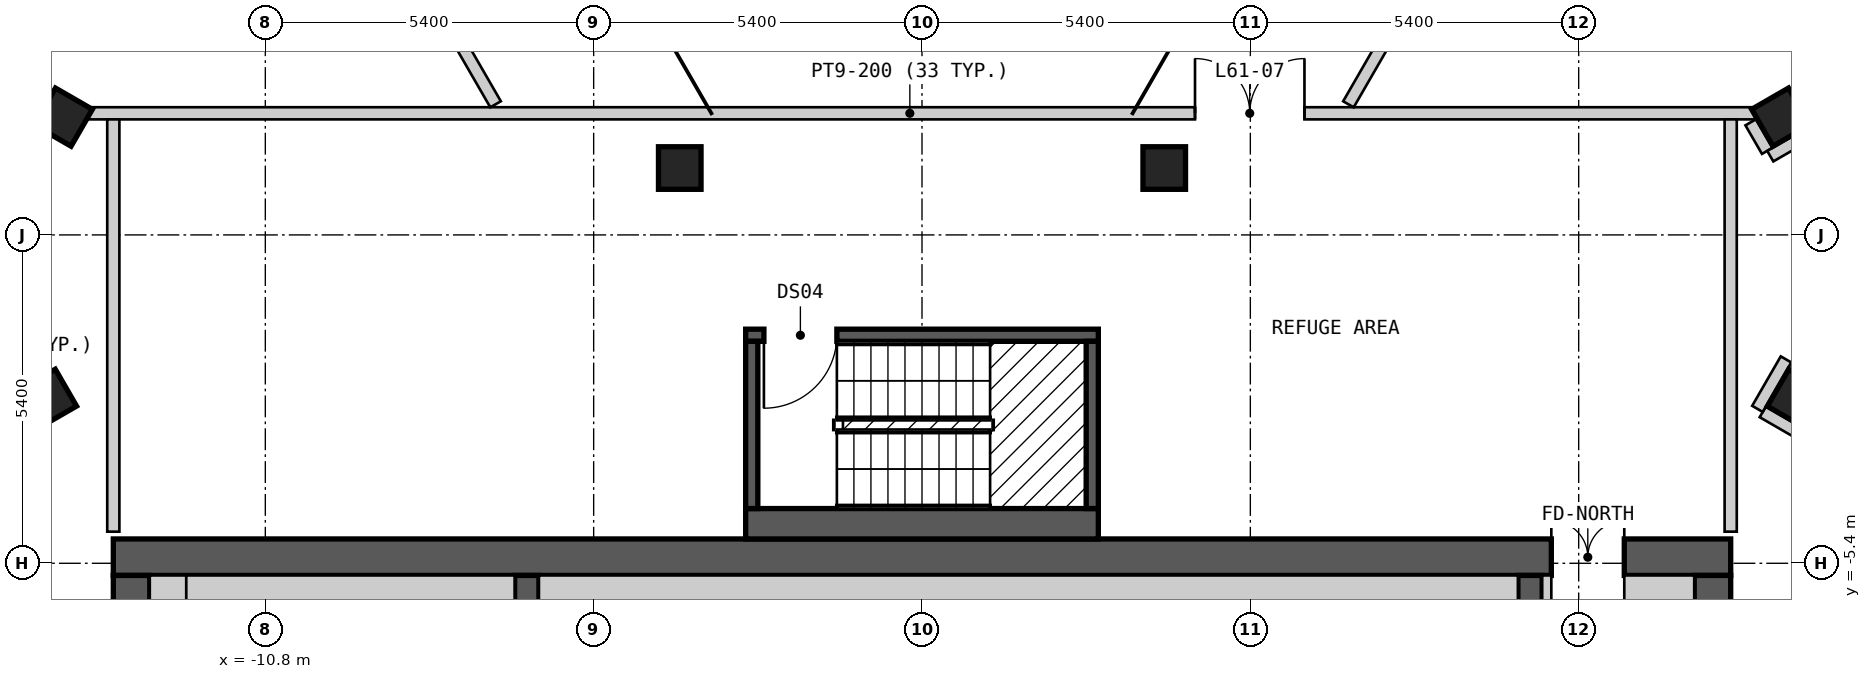
"""IFC4 building model, lengths in metres.
Left out: names, types, materials, properties, quantities, classifications, styles, units other than length and angle.
Written with IfcOpenShell. Run it as: python <this file> out.ifc"""

import sys

from ifc_helpers import new_model, si_unit, direction, frame, frame_2d, origin, origin_2d, place, context, subcontext, project, spatial, rectangle, extrude, element, fill, save


model = new_model("IFC4")
c1 = context("Model", 3, precision=1e-05, world=origin(), true_north=direction((0.0, 1.0)))
c2 = subcontext(c1, "Body", "Model", "MODEL_VIEW")
j1 = project(units=[si_unit("LENGTHUNIT", "METRE"), si_unit("PLANEANGLEUNIT", "RADIAN")], contexts=[c1])
p1 = place(None, origin())
s1 = spatial("IfcSite", under=j1, at=p1, CompositionType="ELEMENT")
p2 = place(p1, origin())
s2 = spatial("IfcBuilding", under=s1, at=p2, CompositionType="ELEMENT")
p3 = place(p2, frame((0.0, 0.0, 199.2)))
s3 = spatial("IfcBuildingStorey", under=s2, at=p3, CompositionType="ELEMENT", Elevation=199.2)
for number, where, z_axis, x_axis in (
    (1, (-14.383, -2.687, 0.0), (0.0, 0.0, 1.0), (0.5, -0.866, 0.0)),
    (2, (14.382, -2.689, 0.0), (0.0, 0.0, 1.0), (0.5, 0.866, 0.0)),
    (3, (14.123, 1.937, 0.0), (0.0, 0.0, 1.0), (-0.5, 0.866, 0.0)),
    (4, (3.984, 1.1, 0.0), (0.0, 0.0, 1.0), (1.0, 0.0, 0.0)),
    (5, (-3.984, 1.1, 0.0), (0.0, 0.0, 1.0), (1.0, 0.0, 0.0)),
    (6, (-14.123, 1.937, 0.0), (0.0, 0.0, 1.0), (-0.5, -0.866, 0.0)),
):
    element("IfcColumn", number, at=place(p3, frame(where, z_axis=z_axis, x_axis=x_axis)), inside=s3, PredefinedType="COLUMN", context=c2, shape_type="SweptSolid", body=[
        extrude(rectangle(XDim=0.7, YDim=0.7, at=origin_2d()), origin(), (0.0, 0.0, 1.0), 3.6),
    ])
p4 = place(p3, frame((-13.3, -5.3, 0.0), z_axis=(0.0, 0.0, 1.0), x_axis=(1.0, 0.0, 0.0)))
e7 = element("IfcWall", 7, at=p4, inside=s3, PredefinedType="SHEAR", context=c2, shape_type="SweptSolid", body=[
    extrude(rectangle(XDim=26.6, YDim=0.6, at=frame_2d((13.3, 0.0))), origin(), (0.0, 0.0, 1.0), 2.6),
])
p5 = place(p4, frame((23.65, 0.0, 0.0)))
e8 = element("IfcOpeningElement", 8, at=p5, cuts=e7, PredefinedType="OPENING", context=c2, shape_type="SweptSolid", body=[
    extrude(rectangle(XDim=1.2, YDim=2.1, at=frame_2d((0.6, 1.05))), frame((0.0, 0.31, 0.0), z_axis=(0.0, -1.0, 0.0), x_axis=(1.0, 0.0, 0.0)), (0.0, 0.0, 1.0), 0.62),
])
p6 = place(p3, frame((-13.0, -18.4, 0.0), z_axis=(0.0, 0.0, 1.0), x_axis=(0.0, 1.0, 0.0)))
e9 = element("IfcWall", 9, at=p6, inside=s3, PredefinedType="SHEAR", context=c2, shape_type="SweptSolid", body=[
    extrude(rectangle(XDim=12.8, YDim=0.6, at=frame_2d((6.4, 0.0))), origin(), (0.0, 0.0, 1.0), 2.6),
])
p7 = place(p6, frame((4.2, 0.0, 0.0)))
e10 = element("IfcOpeningElement", 10, at=p7, cuts=e9, PredefinedType="OPENING", context=c2, shape_type="SweptSolid", body=[
    extrude(rectangle(XDim=1.2, YDim=2.1, at=frame_2d((0.6, 1.05))), frame((0.0, 0.31, 0.0), z_axis=(0.0, -1.0, 0.0), x_axis=(1.0, 0.0, 0.0)), (0.0, 0.0, 1.0), 0.62),
])
p8 = place(p3, frame((13.0, -18.4, 0.0), z_axis=(0.0, 0.0, 1.0), x_axis=(0.0, 1.0, 0.0)))
e11 = element("IfcWall", 11, at=p8, inside=s3, PredefinedType="SHEAR", context=c2, shape_type="SweptSolid", body=[
    extrude(rectangle(XDim=12.8, YDim=0.6, at=frame_2d((6.4, 0.0))), origin(), (0.0, 0.0, 1.0), 2.6),
])
for number, where, z_axis, x_axis in (
    (12, (-6.5, -9.15, 0.0), (0.0, 0.0, 1.0), (0.0, 1.0, 0.0)),
    (13, (10.0, -9.15, 0.0), (0.0, 0.0, 1.0), (0.0, 1.0, 0.0)),
):
    element("IfcWall", number, at=place(p3, frame(where, z_axis=z_axis, x_axis=x_axis)), inside=s3, PredefinedType="SHEAR", context=c2, shape_type="SweptSolid", body=[
        extrude(rectangle(XDim=3.55, YDim=0.4, at=frame_2d((1.775, 0.0))), origin(), (0.0, 0.0, 1.0), 2.6),
    ])
p9 = place(p3, frame((-2.9, -4.75, 0.0), z_axis=(0.0, 0.0, 1.0), x_axis=(1.0, 0.0, 0.0)))
e14 = element("IfcWall", 14, at=p9, inside=s3, PredefinedType="SOLIDWALL", context=c2, shape_type="SweptSolid", body=[
    extrude(rectangle(XDim=5.8, YDim=0.5, at=frame_2d((2.9, 0.0))), origin(), (0.0, 0.0, 1.0), 2.6),
])
p10 = place(p3, frame((-2.9, -1.65, 0.0), z_axis=(0.0, 0.0, 1.0), x_axis=(1.0, 0.0, 0.0)))
e15 = element("IfcWall", 15, at=p10, inside=s3, PredefinedType="SOLIDWALL", context=c2, shape_type="SweptSolid", body=[
    extrude(rectangle(XDim=5.8, YDim=0.2, at=frame_2d((2.9, 0.0))), origin(), (0.0, 0.0, 1.0), 2.6),
])
p11 = place(p10, frame((0.3, 0.0, 0.0)))
e16 = element("IfcOpeningElement", 16, at=p11, cuts=e15, PredefinedType="OPENING", context=c2, shape_type="SweptSolid", body=[
    extrude(rectangle(XDim=1.2, YDim=2.1, at=frame_2d((0.6, 1.05))), frame((0.0, 0.11, 0.0), z_axis=(0.0, -1.0, 0.0), x_axis=(1.0, 0.0, 0.0)), (0.0, 0.0, 1.0), 0.22),
])
for number, where, z_axis, x_axis in (
    (17, (-2.8, -4.5, 0.0), (0.0, 0.0, 1.0), (0.0, 1.0, 0.0)),
    (18, (2.8, -4.5, 0.0), (0.0, 0.0, 1.0), (0.0, 1.0, 0.0)),
):
    element("IfcWall", number, at=place(p3, frame(where, z_axis=z_axis, x_axis=x_axis)), inside=s3, PredefinedType="SOLIDWALL", context=c2, shape_type="SweptSolid", body=[
        extrude(rectangle(XDim=2.75, YDim=0.2, at=frame_2d((1.375, 0.0))), origin(), (0.0, 0.0, 1.0), 2.6),
    ])
p12 = place(p3, frame((-21.482, 2.0, 0.0), z_axis=(0.0, 0.0, 1.0), x_axis=(1.0, 0.0, 0.0)))
e19 = element("IfcWall", 19, at=p12, inside=s3, PredefinedType="SOLIDWALL", context=c2, shape_type="SweptSolid", body=[
    extrude(rectangle(XDim=42.564, YDim=0.2, at=frame_2d((21.282, 0.0))), origin(), (0.0, 0.0, 1.0), 2.6),
])
p13 = place(p12, frame((4.432, 0.0, 0.0)))
e20 = element("IfcOpeningElement", 20, at=p13, cuts=e19, PredefinedType="OPENING", context=c2, shape_type="SweptSolid", body=[
    extrude(rectangle(XDim=1.0, YDim=2.1, at=frame_2d((0.5, 1.05))), frame((0.0, 0.11, 0.0), z_axis=(0.0, -1.0, 0.0), x_axis=(1.0, 0.0, 0.0)), (0.0, 0.0, 1.0), 0.22),
])
p14 = place(p12, frame((25.972, 0.0, 0.0)))
e21 = element("IfcOpeningElement", 21, at=p14, cuts=e19, PredefinedType="OPENING", context=c2, shape_type="SweptSolid", body=[
    extrude(rectangle(XDim=1.8, YDim=2.1, at=frame_2d((0.9, 1.05))), frame((0.0, 0.11, 0.0), z_axis=(0.0, -1.0, 0.0), x_axis=(1.0, 0.0, 0.0)), (0.0, 0.0, 1.0), 0.22),
])
for number, where, z_axis, x_axis in (
    (22, (-13.3, -4.88, 0.0), (0.0, 0.0, 1.0), (0.0, 1.0, 0.0)),
    (23, (13.3, -4.88, 0.0), (0.0, 0.0, 1.0), (0.0, 1.0, 0.0)),
):
    element("IfcWall", number, at=place(p3, frame(where, z_axis=z_axis, x_axis=x_axis)), inside=s3, PredefinedType="PARTITIONING", context=c2, shape_type="SweptSolid", body=[
        extrude(rectangle(XDim=6.78, YDim=0.2, at=frame_2d((3.39, 0.0))), origin(), (0.0, 0.0, 1.0), 2.6),
    ])
p15 = place(p3, frame((14.297, -2.097, 0.0), z_axis=(0.0, 0.0, 1.0), x_axis=(0.865922902183, -0.50017749597, 0.0)))
e24 = element("IfcWall", 24, at=p15, inside=s3, PredefinedType="SOLIDWALL", context=c2, shape_type="SweptSolid", body=[
    extrude(rectangle(XDim=0.65, YDim=0.2, at=frame_2d((0.325, 0.0))), origin(), (0.0, 0.0, 1.0), 2.6),
])
p16 = place(p3, frame((13.827, -2.911, 0.0), z_axis=(0.0, 0.0, 1.0), x_axis=(0.86571247639, -0.500541614877, 0.0)))
e25 = element("IfcWall", 25, at=p16, inside=s3, PredefinedType="SOLIDWALL", context=c2, shape_type="SweptSolid", body=[
    extrude(rectangle(XDim=0.74, YDim=0.2, at=frame_2d((0.37, 0.0))), origin(), (0.0, 0.0, 1.0), 2.6),
])
p17 = place(p3, frame((-10.392, 8.0, 0.0), z_axis=(0.0, 0.0, 1.0), x_axis=(0.500051862572, -0.865995458844, 0.0)))
e26 = element("IfcWall", 26, at=p17, inside=s3, PredefinedType="SOLIDWALL", context=c2, shape_type="SweptSolid", body=[
    extrude(rectangle(XDim=6.758, YDim=0.2, at=frame_2d((3.379, 0.0))), origin(), (0.0, 0.0, 1.0), 2.6),
])
p18 = place(p3, frame((13.629, 1.852, 0.0), z_axis=(0.0, 0.0, 1.0), x_axis=(0.500876749519, -0.86551862013, 0.0)))
e27 = element("IfcWall", 27, at=p18, inside=s3, PredefinedType="SOLIDWALL", context=c2, shape_type="SweptSolid", body=[
    extrude(rectangle(XDim=0.543, YDim=0.2, at=frame_2d((0.271, 0.0))), origin(), (0.0, 0.0, 1.0), 2.6),
])
p19 = place(p3, frame((12.237, 18.705, 0.0), z_axis=(0.0, 0.0, 1.0), x_axis=(0.499970611561, -0.866042370543, 0.0)))
e28 = element("IfcWall", 28, at=p19, inside=s3, PredefinedType="SOLIDWALL", context=c2, shape_type="SweptSolid", body=[
    extrude(rectangle(XDim=20.155, YDim=0.2, at=frame_2d((10.078, 0.0))), origin(), (0.0, 0.0, 1.0), 2.6),
])
p20 = place(p3, frame((13.951, 1.295, 0.0), z_axis=(0.0, 0.0, 1.0), x_axis=(0.866234320545, 0.499637970844, 0.0)))
e29 = element("IfcWall", 29, at=p20, inside=s3, PredefinedType="SOLIDWALL", context=c2, shape_type="SweptSolid", body=[
    extrude(rectangle(XDim=0.75, YDim=0.2, at=frame_2d((0.375, 0.0))), origin(), (0.0, 0.0, 1.0), 2.6),
])
p21 = place(p3, frame((13.74, -2.861, 0.0), z_axis=(0.0, 0.0, 1.0), x_axis=(0.500022248069, 0.866012558475, 0.0)))
e30 = element("IfcWall", 30, at=p21, inside=s3, PredefinedType="SOLIDWALL", context=c2, shape_type="SweptSolid", body=[
    extrude(rectangle(XDim=0.94, YDim=0.2, at=frame_2d((0.47, 0.0))), origin(), (0.0, 0.0, 1.0), 2.6),
])
p22 = place(p3, frame((7.013, 2.148, 0.0), z_axis=(0.0, 0.0, 1.0), x_axis=(0.499983511822, 0.866034923029, 0.0)))
e31 = element("IfcWall", 31, at=p22, inside=s3, PredefinedType="SOLIDWALL", context=c2, shape_type="SweptSolid", body=[
    extrude(rectangle(XDim=6.584, YDim=0.2, at=frame_2d((3.292, 0.0))), origin(), (0.0, 0.0, 1.0), 2.6),
])
p23 = place(p3, frame((-12.4, -9.15, 0.0), z_axis=(0.0, 0.0, 1.0), x_axis=(0.0, 1.0, 0.0)))
e32 = element("IfcWall", 32, at=p23, inside=s3, PredefinedType="SOLIDWALL", context=c2, shape_type="SweptSolid", body=[
    extrude(rectangle(XDim=3.55, YDim=0.6, at=frame_2d((1.775, 0.0))), origin(), (0.0, 0.0, 1.0), 2.6),
])
p24 = place(p3, frame((-12.1, -5.9, 0.0), z_axis=(0.0, 0.0, 1.0), x_axis=(1.0, 0.0, 0.0)))
e33 = element("IfcWall", 33, at=p24, inside=s3, PredefinedType="SOLIDWALL", context=c2, shape_type="SweptSolid", body=[
    extrude(rectangle(XDim=5.4, YDim=0.6, at=frame_2d((2.7, 0.0))), origin(), (0.0, 0.0, 1.0), 2.6),
])
p25 = place(p3, frame((-6.3, -5.9, 0.0), z_axis=(0.0, 0.0, 1.0), x_axis=(1.0, 0.0, 0.0)))
e34 = element("IfcWall", 34, at=p25, inside=s3, PredefinedType="SOLIDWALL", context=c2, shape_type="SweptSolid", body=[
    extrude(rectangle(XDim=16.1, YDim=0.6, at=frame_2d((8.05, 0.0))), origin(), (0.0, 0.0, 1.0), 2.6),
])
p26 = place(p3, frame((10.275, -6.2, 0.0), z_axis=(0.0, 0.0, 1.0), x_axis=(0.0, 1.0, 0.0)))
e35 = element("IfcWall", 35, at=p26, inside=s3, PredefinedType="PARTITIONING", context=c2, shape_type="SweptSolid", body=[
    extrude(rectangle(XDim=0.6, YDim=0.15, at=frame_2d((0.3, 0.0))), origin(), (0.0, 0.0, 1.0), 2.6),
])
p27 = place(p3, frame((11.55, -5.9, 0.0), z_axis=(0.0, 0.0, 1.0), x_axis=(1.0, 0.0, 0.0)))
e36 = element("IfcWall", 36, at=p27, inside=s3, PredefinedType="PARTITIONING", context=c2, shape_type="SweptSolid", body=[
    extrude(rectangle(XDim=1.15, YDim=0.6, at=frame_2d((0.575, 0.0))), origin(), (0.0, 0.0, 1.0), 2.6),
])
p28 = place(p11, origin())
e37 = element("IfcDoor", 37, at=p28, inside=s3, OperationType="SINGLE_SWING_LEFT", PredefinedType="DOOR", context=c2, shape_type="SweptSolid", body=[
    extrude(rectangle(XDim=1.2, YDim=2.1, at=frame_2d((0.6, 1.05))), frame((0.0, 0.025, 0.0), z_axis=(0.0, -1.0, 0.0), x_axis=(1.0, 0.0, 0.0)), (0.0, 0.0, 1.0), 0.05),
])
fill(e16, e37)
p29 = place(p14, origin())
e38 = element("IfcDoor", 38, at=p29, inside=s3, OperationType="DOUBLE_DOOR_SINGLE_SWING", PredefinedType="DOOR", context=c2, shape_type="SweptSolid", body=[
    extrude(rectangle(XDim=1.8, YDim=2.1, at=frame_2d((0.9, 1.05))), frame((0.0, 0.025, 0.0), z_axis=(0.0, -1.0, 0.0), x_axis=(1.0, 0.0, 0.0)), (0.0, 0.0, 1.0), 0.05),
])
fill(e21, e38)
p30 = place(p5, origin())
e39 = element("IfcDoor", 39, at=p30, inside=s3, OperationType="DOUBLE_DOOR_SINGLE_SWING", PredefinedType="DOOR", context=c2, shape_type="SweptSolid", body=[
    extrude(rectangle(XDim=1.2, YDim=2.1, at=frame_2d((0.6, 1.05))), frame((0.0, 0.025, 0.0), z_axis=(0.0, -1.0, 0.0), x_axis=(1.0, 0.0, 0.0)), (0.0, 0.0, 1.0), 0.05),
])
fill(e8, e39)
save(model, sys.argv[1])
